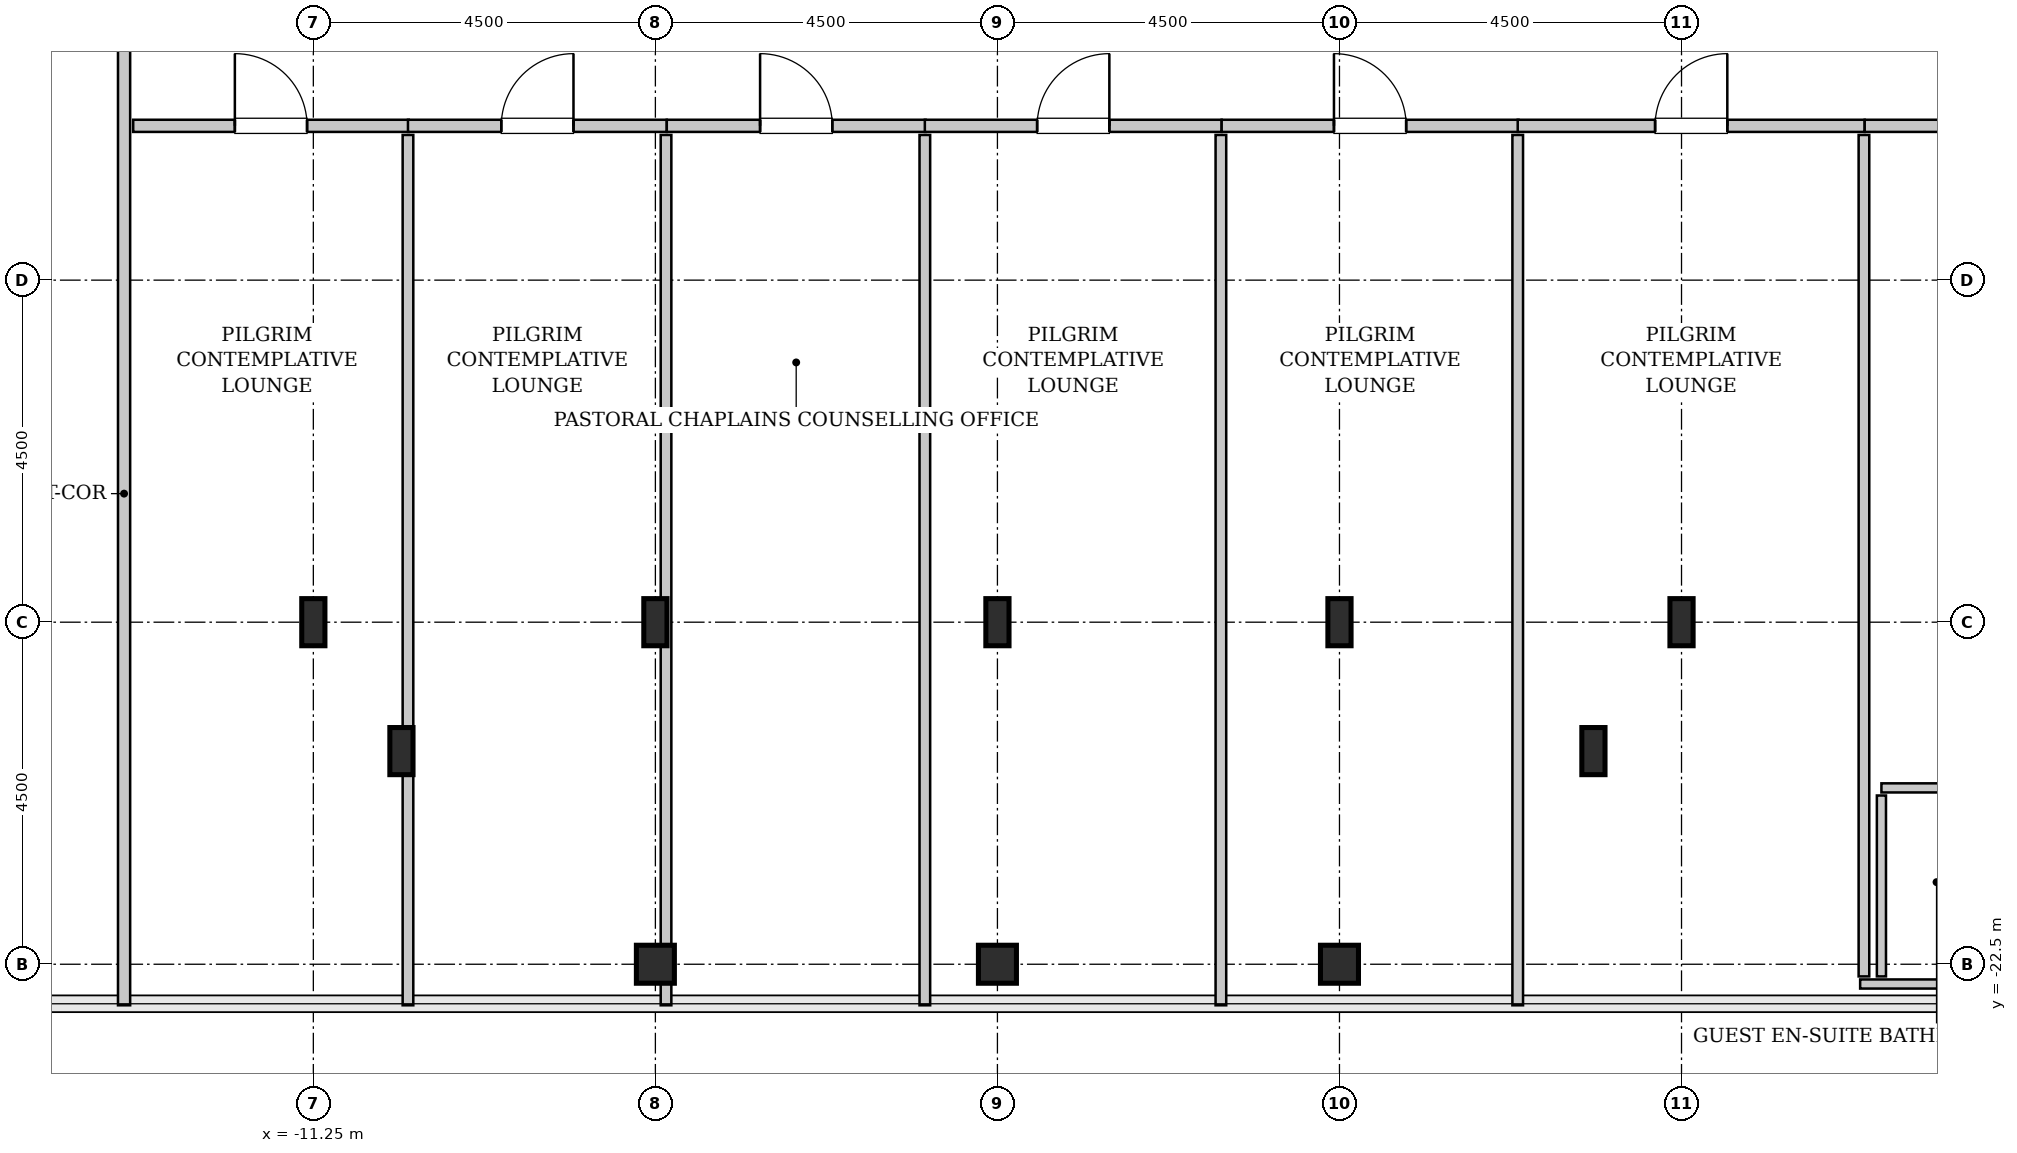
"""IFC4 building model, lengths in metres.
Left out: names, types, materials, properties, quantities, classifications, styles, units other than length and angle.
Written with IfcOpenShell. Run it as: python <this file> out.ifc"""

import sys

from ifc_helpers import new_model, si_unit, direction, frame, frame_2d, origin, origin_2d, place, context, subcontext, project, spatial, rectangle, hollow_rectangle, i_section, extrude, source, transform, mapped, element, fill, save


model = new_model("IFC4")
c1 = context("Model", 3, precision=1e-05, world=origin(), true_north=direction((0.0, 1.0)))
c2 = subcontext(c1, "Body", "Model", "MODEL_VIEW")
j1 = project(units=[si_unit("LENGTHUNIT", "METRE"), si_unit("PLANEANGLEUNIT", "RADIAN")], contexts=[c1])
p1 = place(None, origin())
s1 = spatial("IfcSite", under=j1, at=p1, CompositionType="ELEMENT")
p2 = place(p1, origin())
s2 = spatial("IfcBuilding", under=s1, at=p2, CompositionType="ELEMENT")
p3 = place(p2, frame((0.0, 0.0, 310.2)))
s3 = spatial("IfcBuildingStorey", under=s2, at=p3, CompositionType="ELEMENT", Elevation=310.2)
m1 = source(origin(), c2, "Body", "SweptSolid", [
    extrude(i_section(OverallWidth=0.305, OverallDepth=0.62, WebThickness=0.021, FlangeThickness=0.04, FilletRadius=0.027, at=origin_2d()), origin(), (0.0, 0.0, 1.0), 3.8),
])
for number, where, z_axis, x_axis in (
    (1, (-11.25, -18.0, 0.0), (0.0, 0.0, 1.0), (1.0, 0.0, 0.0)),
    (2, (-10.091, -19.696, 0.0), (0.0, 0.0, 1.0), (1.0, 0.0, 0.0)),
):
    element("IfcColumn", number, at=place(p3, frame(where, z_axis=z_axis, x_axis=x_axis)), inside=s3, PredefinedType="COLUMN", context=c2, shape_type="MappedRepresentation", body=[
        mapped(m1, transform((0.0, 0.0, 0.0), x_axis=(1.0, 0.0, 0.0), y_axis=(0.0, 1.0, 0.0), z_axis=(0.0, 0.0, 1.0), scale=1.0)),
    ])
m2 = source(origin(), c2, "Body", "SweptSolid", [
    extrude(hollow_rectangle(XDim=0.5, YDim=0.5, WallThickness=0.025, InnerFilletRadius=0.025, OuterFilletRadius=0.05, at=origin_2d()), origin(), (0.0, 0.0, 1.0), 3.8),
])
p4 = place(p3, frame((-6.75, -22.5, 0.0), z_axis=(0.0, 0.0, 1.0), x_axis=(1.0, 0.0, 0.0)))
e3 = element("IfcColumn", 3, at=p4, inside=s3, PredefinedType="COLUMN", context=c2, shape_type="MappedRepresentation", body=[
    mapped(m2, transform((0.0, 0.0, 0.0), x_axis=(1.0, 0.0, 0.0), y_axis=(0.0, 1.0, 0.0), z_axis=(0.0, 0.0, 1.0), scale=1.0)),
])
p5 = place(p3, frame((-6.75, -18.0, 0.0), z_axis=(0.0, 0.0, 1.0), x_axis=(1.0, 0.0, 0.0)))
e4 = element("IfcColumn", 4, at=p5, inside=s3, PredefinedType="COLUMN", context=c2, shape_type="MappedRepresentation", body=[
    mapped(m1, transform((0.0, 0.0, 0.0), x_axis=(1.0, 0.0, 0.0), y_axis=(0.0, 1.0, 0.0), z_axis=(0.0, 0.0, 1.0), scale=1.0)),
])
p6 = place(p3, frame((-2.25, -22.5, 0.0), z_axis=(0.0, 0.0, 1.0), x_axis=(1.0, 0.0, 0.0)))
e5 = element("IfcColumn", 5, at=p6, inside=s3, PredefinedType="COLUMN", context=c2, shape_type="MappedRepresentation", body=[
    mapped(m2, transform((0.0, 0.0, 0.0), x_axis=(1.0, 0.0, 0.0), y_axis=(0.0, 1.0, 0.0), z_axis=(0.0, 0.0, 1.0), scale=1.0)),
])
p7 = place(p3, frame((-2.25, -18.0, 0.0), z_axis=(0.0, 0.0, 1.0), x_axis=(1.0, 0.0, 0.0)))
e6 = element("IfcColumn", 6, at=p7, inside=s3, PredefinedType="COLUMN", context=c2, shape_type="MappedRepresentation", body=[
    mapped(m1, transform((0.0, 0.0, 0.0), x_axis=(1.0, 0.0, 0.0), y_axis=(0.0, 1.0, 0.0), z_axis=(0.0, 0.0, 1.0), scale=1.0)),
])
p8 = place(p3, frame((2.25, -22.5, 0.0), z_axis=(0.0, 0.0, 1.0), x_axis=(1.0, 0.0, 0.0)))
e7 = element("IfcColumn", 7, at=p8, inside=s3, PredefinedType="COLUMN", context=c2, shape_type="MappedRepresentation", body=[
    mapped(m2, transform((0.0, 0.0, 0.0), x_axis=(1.0, 0.0, 0.0), y_axis=(0.0, 1.0, 0.0), z_axis=(0.0, 0.0, 1.0), scale=1.0)),
])
for number, where, z_axis, x_axis in (
    (8, (2.25, -18.0, 0.0), (0.0, 0.0, 1.0), (1.0, 0.0, 0.0)),
    (9, (5.591, -19.696, 0.0), (0.0, 0.0, 1.0), (1.0, 0.0, 0.0)),
    (10, (6.75, -18.0, 0.0), (0.0, 0.0, 1.0), (1.0, 0.0, 0.0)),
):
    element("IfcColumn", number, at=place(p3, frame(where, z_axis=z_axis, x_axis=x_axis)), inside=s3, PredefinedType="COLUMN", context=c2, shape_type="MappedRepresentation", body=[
        mapped(m1, transform((0.0, 0.0, 0.0), x_axis=(1.0, 0.0, 0.0), y_axis=(0.0, 1.0, 0.0), z_axis=(0.0, 0.0, 1.0), scale=1.0)),
    ])
m3 = source(origin(), c2, "Body", "SweptSolid", [
    extrude(rectangle(XDim=3.14, YDim=0.12, at=frame_2d((1.57, 0.0))), origin(), (0.0, 0.0, 1.0), 3.535),
])
p9 = place(p3, frame((9.1, -22.76, 0.0), z_axis=(0.0, 0.0, 1.0), x_axis=(1.0, 0.0, 0.0)))
e11 = element("IfcWall", 11, at=p9, inside=s3, PredefinedType="PLUMBINGWALL", context=c2, shape_type="MappedRepresentation", body=[
    mapped(m3, transform((0.0, 0.0, 0.0), x_axis=(1.0, 0.0, 0.0), y_axis=(0.0, 1.0, 0.0), z_axis=(0.0, 0.0, 1.0), scale=1.0)),
])
m4 = source(origin(), c2, "Body", "SweptSolid", [
    extrude(rectangle(XDim=2.48, YDim=0.12, at=frame_2d((1.24, 0.0))), origin(), (0.0, 0.0, 1.0), 3.535),
])
p10 = place(p3, frame((9.38, -20.18, 0.0), z_axis=(0.0, 0.0, 1.0), x_axis=(1.0, 0.0, 0.0)))
e12 = element("IfcWall", 12, at=p10, inside=s3, PredefinedType="PLUMBINGWALL", context=c2, shape_type="MappedRepresentation", body=[
    mapped(m4, transform((0.0, 0.0, 0.0), x_axis=(1.0, 0.0, 0.0), y_axis=(0.0, 1.0, 0.0), z_axis=(0.0, 0.0, 1.0), scale=1.0)),
])
m5 = source(origin(), c2, "Body", "SweptSolid", [
    extrude(rectangle(XDim=2.38, YDim=0.12, at=frame_2d((1.19, 0.0))), origin(), (0.0, 0.0, 1.0), 3.535),
])
p11 = place(p3, frame((9.38, -22.66, 0.0), z_axis=(0.0, 0.0, 1.0), x_axis=(0.0, 1.0, 0.0)))
e13 = element("IfcWall", 13, at=p11, inside=s3, PredefinedType="PLUMBINGWALL", context=c2, shape_type="MappedRepresentation", body=[
    mapped(m5, transform((0.0, 0.0, 0.0), x_axis=(1.0, 0.0, 0.0), y_axis=(0.0, 1.0, 0.0), z_axis=(0.0, 0.0, 1.0), scale=1.0)),
])
m6 = source(origin(), c2, "Body", "SweptSolid", [
    extrude(rectangle(XDim=16.245, YDim=0.16, at=frame_2d((8.123, 0.0))), origin(), (0.0, 0.0, 1.0), 3.535),
])
p12 = place(p3, frame((-13.74, -23.04, 0.0), z_axis=(0.0, 0.0, 1.0), x_axis=(0.0, 1.0, 0.0)))
e14 = element("IfcWall", 14, at=p12, inside=s3, PredefinedType="PARTITIONING", context=c2, shape_type="MappedRepresentation", body=[
    mapped(m6, transform((0.0, 0.0, 0.0), x_axis=(1.0, 0.0, 0.0), y_axis=(0.0, 1.0, 0.0), z_axis=(0.0, 0.0, 1.0), scale=1.0)),
])
p13 = place(p12, frame((13.413, 0.0, 0.0)))
e15 = element("IfcOpeningElement", 15, at=p13, cuts=e14, PredefinedType="OPENING", context=c2, shape_type="SweptSolid", body=[
    extrude(rectangle(XDim=0.95, YDim=2.1, at=frame_2d((0.475, 1.05))), frame((0.0, 0.09, 0.0), z_axis=(0.0, -1.0, 0.0), x_axis=(1.0, 0.0, 0.0)), (0.0, 0.0, 1.0), 0.18),
])
m7 = source(origin(), c2, "Body", "SweptSolid", [
    extrude(rectangle(XDim=3.625, YDim=0.16, at=frame_2d((1.812, 0.0))), origin(), (0.0, 0.0, 1.0), 3.535),
])
p14 = place(p3, frame((-13.62, -11.47, 0.0), z_axis=(0.0, 0.0, 1.0), x_axis=(1.0, 0.0, 0.0)))
e16 = element("IfcWall", 16, at=p14, inside=s3, PredefinedType="PARTITIONING", context=c2, shape_type="MappedRepresentation", body=[
    mapped(m7, transform((0.0, 0.0, 0.0), x_axis=(1.0, 0.0, 0.0), y_axis=(0.0, 1.0, 0.0), z_axis=(0.0, 0.0, 1.0), scale=1.0)),
])
p15 = place(p14, frame((1.337, 0.0, 0.0)))
e17 = element("IfcOpeningElement", 17, at=p15, cuts=e16, PredefinedType="OPENING", context=c2, shape_type="SweptSolid", body=[
    extrude(rectangle(XDim=0.95, YDim=2.1, at=frame_2d((0.475, 1.05))), frame((0.0, 0.09, 0.0), z_axis=(0.0, -1.0, 0.0), x_axis=(1.0, 0.0, 0.0)), (0.0, 0.0, 1.0), 0.18),
])
m8 = source(origin(), c2, "Body", "SweptSolid", [
    extrude(rectangle(XDim=11.45, YDim=0.14, at=frame_2d((5.725, 0.0))), origin(), (0.0, 0.0, 1.0), 3.535),
])
p16 = place(p3, frame((-10.005, -23.04, 0.0), z_axis=(0.0, 0.0, 1.0), x_axis=(0.0, 1.0, 0.0)))
e18 = element("IfcWall", 18, at=p16, inside=s3, PredefinedType="PARTITIONING", context=c2, shape_type="MappedRepresentation", body=[
    mapped(m8, transform((0.0, 0.0, 0.0), x_axis=(1.0, 0.0, 0.0), y_axis=(0.0, 1.0, 0.0), z_axis=(0.0, 0.0, 1.0), scale=1.0)),
])
m9 = source(origin(), c2, "Body", "SweptSolid", [
    extrude(rectangle(XDim=3.405, YDim=0.16, at=frame_2d((1.702, 0.0))), origin(), (0.0, 0.0, 1.0), 3.535),
])
p17 = place(p3, frame((-10.005, -11.47, 0.0), z_axis=(0.0, 0.0, 1.0), x_axis=(1.0, 0.0, 0.0)))
e19 = element("IfcWall", 19, at=p17, inside=s3, PredefinedType="PARTITIONING", context=c2, shape_type="MappedRepresentation", body=[
    mapped(m9, transform((0.0, 0.0, 0.0), x_axis=(1.0, 0.0, 0.0), y_axis=(0.0, 1.0, 0.0), z_axis=(0.0, 0.0, 1.0), scale=1.0)),
])
p18 = place(p17, frame((1.228, 0.0, 0.0)))
e20 = element("IfcOpeningElement", 20, at=p18, cuts=e19, PredefinedType="OPENING", context=c2, shape_type="SweptSolid", body=[
    extrude(rectangle(XDim=0.95, YDim=2.1, at=frame_2d((0.475, 1.05))), frame((0.0, 0.09, 0.0), z_axis=(0.0, -1.0, 0.0), x_axis=(1.0, 0.0, 0.0)), (0.0, 0.0, 1.0), 0.18),
])
m10 = source(origin(), c2, "Body", "SweptSolid", [
    extrude(rectangle(XDim=11.45, YDim=0.14, at=frame_2d((5.725, 0.0))), origin(), (0.0, 0.0, 1.0), 2.975),
])
p19 = place(p3, frame((-6.61, -23.04, 0.0), z_axis=(0.0, 0.0, 1.0), x_axis=(0.0, 1.0, 0.0)))
e21 = element("IfcWall", 21, at=p19, inside=s3, PredefinedType="PARTITIONING", context=c2, shape_type="MappedRepresentation", body=[
    mapped(m10, transform((0.0, 0.0, 0.0), x_axis=(1.0, 0.0, 0.0), y_axis=(0.0, 1.0, 0.0), z_axis=(0.0, 0.0, 1.0), scale=1.0)),
])
m11 = source(origin(), c2, "Body", "SweptSolid", [
    extrude(rectangle(XDim=3.405, YDim=0.16, at=frame_2d((1.703, 0.0))), origin(), (0.0, 0.0, 1.0), 3.535),
])
p20 = place(p3, frame((-6.6, -11.47, 0.0), z_axis=(0.0, 0.0, 1.0), x_axis=(1.0, 0.0, 0.0)))
e22 = element("IfcWall", 22, at=p20, inside=s3, PredefinedType="PARTITIONING", context=c2, shape_type="MappedRepresentation", body=[
    mapped(m11, transform((0.0, 0.0, 0.0), x_axis=(1.0, 0.0, 0.0), y_axis=(0.0, 1.0, 0.0), z_axis=(0.0, 0.0, 1.0), scale=1.0)),
])
p21 = place(p20, frame((1.228, 0.0, 0.0)))
e23 = element("IfcOpeningElement", 23, at=p21, cuts=e22, PredefinedType="OPENING", context=c2, shape_type="SweptSolid", body=[
    extrude(rectangle(XDim=0.95, YDim=2.1, at=frame_2d((0.475, 1.05))), frame((0.0, 0.09, 0.0), z_axis=(0.0, -1.0, 0.0), x_axis=(1.0, 0.0, 0.0)), (0.0, 0.0, 1.0), 0.18),
])
p22 = place(p3, frame((-3.205, -23.04, 0.0), z_axis=(0.0, 0.0, 1.0), x_axis=(0.0, 1.0, 0.0)))
e24 = element("IfcWall", 24, at=p22, inside=s3, PredefinedType="PARTITIONING", context=c2, shape_type="MappedRepresentation", body=[
    mapped(m8, transform((0.0, 0.0, 0.0), x_axis=(1.0, 0.0, 0.0), y_axis=(0.0, 1.0, 0.0), z_axis=(0.0, 0.0, 1.0), scale=1.0)),
])
m12 = source(origin(), c2, "Body", "SweptSolid", [
    extrude(rectangle(XDim=3.905, YDim=0.16, at=frame_2d((1.953, 0.0))), origin(), (0.0, 0.0, 1.0), 3.535),
])
p23 = place(p3, frame((-3.205, -11.47, 0.0), z_axis=(0.0, 0.0, 1.0), x_axis=(1.0, 0.0, 0.0)))
e25 = element("IfcWall", 25, at=p23, inside=s3, PredefinedType="PARTITIONING", context=c2, shape_type="MappedRepresentation", body=[
    mapped(m12, transform((0.0, 0.0, 0.0), x_axis=(1.0, 0.0, 0.0), y_axis=(0.0, 1.0, 0.0), z_axis=(0.0, 0.0, 1.0), scale=1.0)),
])
p24 = place(p23, frame((1.478, 0.0, 0.0)))
e26 = element("IfcOpeningElement", 26, at=p24, cuts=e25, PredefinedType="OPENING", context=c2, shape_type="SweptSolid", body=[
    extrude(rectangle(XDim=0.95, YDim=2.1, at=frame_2d((0.475, 1.05))), frame((0.0, 0.09, 0.0), z_axis=(0.0, -1.0, 0.0), x_axis=(1.0, 0.0, 0.0)), (0.0, 0.0, 1.0), 0.18),
])
p25 = place(p3, frame((0.69, -23.04, 0.0), z_axis=(0.0, 0.0, 1.0), x_axis=(0.0, 1.0, 0.0)))
e27 = element("IfcWall", 27, at=p25, inside=s3, PredefinedType="PARTITIONING", context=c2, shape_type="MappedRepresentation", body=[
    mapped(m8, transform((0.0, 0.0, 0.0), x_axis=(1.0, 0.0, 0.0), y_axis=(0.0, 1.0, 0.0), z_axis=(0.0, 0.0, 1.0), scale=1.0)),
])
p26 = place(p3, frame((0.7, -11.47, 0.0), z_axis=(0.0, 0.0, 1.0), x_axis=(1.0, 0.0, 0.0)))
e28 = element("IfcWall", 28, at=p26, inside=s3, PredefinedType="PARTITIONING", context=c2, shape_type="MappedRepresentation", body=[
    mapped(m12, transform((0.0, 0.0, 0.0), x_axis=(1.0, 0.0, 0.0), y_axis=(0.0, 1.0, 0.0), z_axis=(0.0, 0.0, 1.0), scale=1.0)),
])
p27 = place(p26, frame((1.478, 0.0, 0.0)))
e29 = element("IfcOpeningElement", 29, at=p27, cuts=e28, PredefinedType="OPENING", context=c2, shape_type="SweptSolid", body=[
    extrude(rectangle(XDim=0.95, YDim=2.1, at=frame_2d((0.475, 1.05))), frame((0.0, 0.09, 0.0), z_axis=(0.0, -1.0, 0.0), x_axis=(1.0, 0.0, 0.0)), (0.0, 0.0, 1.0), 0.18),
])
p28 = place(p3, frame((4.595, -23.04, 0.0), z_axis=(0.0, 0.0, 1.0), x_axis=(0.0, 1.0, 0.0)))
e30 = element("IfcWall", 30, at=p28, inside=s3, PredefinedType="PARTITIONING", context=c2, shape_type="MappedRepresentation", body=[
    mapped(m8, transform((0.0, 0.0, 0.0), x_axis=(1.0, 0.0, 0.0), y_axis=(0.0, 1.0, 0.0), z_axis=(0.0, 0.0, 1.0), scale=1.0)),
])
m13 = source(origin(), c2, "Body", "SweptSolid", [
    extrude(rectangle(XDim=4.565, YDim=0.16, at=frame_2d((2.282, 0.0))), origin(), (0.0, 0.0, 1.0), 3.535),
])
p29 = place(p3, frame((4.595, -11.47, 0.0), z_axis=(0.0, 0.0, 1.0), x_axis=(1.0, 0.0, 0.0)))
e31 = element("IfcWall", 31, at=p29, inside=s3, PredefinedType="PARTITIONING", context=c2, shape_type="MappedRepresentation", body=[
    mapped(m13, transform((0.0, 0.0, 0.0), x_axis=(1.0, 0.0, 0.0), y_axis=(0.0, 1.0, 0.0), z_axis=(0.0, 0.0, 1.0), scale=1.0)),
])
p30 = place(p29, frame((1.808, 0.0, 0.0)))
e32 = element("IfcOpeningElement", 32, at=p30, cuts=e31, PredefinedType="OPENING", context=c2, shape_type="SweptSolid", body=[
    extrude(rectangle(XDim=0.95, YDim=2.1, at=frame_2d((0.475, 1.05))), frame((0.0, 0.09, 0.0), z_axis=(0.0, -1.0, 0.0), x_axis=(1.0, 0.0, 0.0)), (0.0, 0.0, 1.0), 0.18),
])
m14 = source(origin(), c2, "Body", "SweptSolid", [
    extrude(rectangle(XDim=11.07, YDim=0.14, at=frame_2d((5.535, 0.0))), origin(), (0.0, 0.0, 1.0), 3.535),
])
p31 = place(p3, frame((9.15, -22.66, 0.0), z_axis=(0.0, 0.0, 1.0), x_axis=(0.0, 1.0, 0.0)))
e33 = element("IfcWall", 33, at=p31, inside=s3, PredefinedType="PARTITIONING", context=c2, shape_type="MappedRepresentation", body=[
    mapped(m14, transform((0.0, 0.0, 0.0), x_axis=(1.0, 0.0, 0.0), y_axis=(0.0, 1.0, 0.0), z_axis=(0.0, 0.0, 1.0), scale=1.0)),
])
m15 = source(origin(), c2, "Body", "SweptSolid", [
    extrude(rectangle(XDim=4.46, YDim=0.16, at=frame_2d((2.23, 0.0))), origin(), (0.0, 0.0, 1.0), 3.535),
])
p32 = place(p3, frame((9.16, -11.47, 0.0), z_axis=(0.0, 0.0, 1.0), x_axis=(1.0, 0.0, 0.0)))
e34 = element("IfcWall", 34, at=p32, inside=s3, PredefinedType="PARTITIONING", context=c2, shape_type="MappedRepresentation", body=[
    mapped(m15, transform((0.0, 0.0, 0.0), x_axis=(1.0, 0.0, 0.0), y_axis=(0.0, 1.0, 0.0), z_axis=(0.0, 0.0, 1.0), scale=1.0)),
])
p33 = place(p32, frame((1.755, 0.0, 0.0)))
e35 = element("IfcOpeningElement", 35, at=p33, cuts=e34, PredefinedType="OPENING", context=c2, shape_type="SweptSolid", body=[
    extrude(rectangle(XDim=0.95, YDim=2.1, at=frame_2d((0.475, 1.05))), frame((0.0, 0.09, 0.0), z_axis=(0.0, -1.0, 0.0), x_axis=(1.0, 0.0, 0.0)), (0.0, 0.0, 1.0), 0.18),
])
m16 = source(origin(), c2, "Body", "SweptSolid", [
    extrude(rectangle(XDim=0.95, YDim=2.1, at=frame_2d((0.475, 1.05))), frame((0.0, 0.025, 0.0), z_axis=(0.0, -1.0, 0.0), x_axis=(1.0, 0.0, 0.0)), (0.0, 0.0, 1.0), 0.05),
])
p34 = place(p15, origin())
e36 = element("IfcDoor", 36, at=p34, inside=s3, OperationType="SINGLE_SWING_LEFT", PredefinedType="DOOR", context=c2, shape_type="MappedRepresentation", body=[
    mapped(m16, transform((0.0, 0.0, 0.0), x_axis=(1.0, 0.0, 0.0), y_axis=(0.0, 1.0, 0.0), z_axis=(0.0, 0.0, 1.0), scale=1.0)),
])
fill(e17, e36)
p35 = place(p18, origin())
e37 = element("IfcDoor", 37, at=p35, inside=s3, OperationType="SINGLE_SWING_RIGHT", PredefinedType="DOOR", context=c2, shape_type="MappedRepresentation", body=[
    mapped(m16, transform((0.0, 0.0, 0.0), x_axis=(1.0, 0.0, 0.0), y_axis=(0.0, 1.0, 0.0), z_axis=(0.0, 0.0, 1.0), scale=1.0)),
])
fill(e20, e37)
p36 = place(p21, origin())
e38 = element("IfcDoor", 38, at=p36, inside=s3, OperationType="SINGLE_SWING_LEFT", PredefinedType="DOOR", context=c2, shape_type="MappedRepresentation", body=[
    mapped(m16, transform((0.0, 0.0, 0.0), x_axis=(1.0, 0.0, 0.0), y_axis=(0.0, 1.0, 0.0), z_axis=(0.0, 0.0, 1.0), scale=1.0)),
])
fill(e23, e38)
p37 = place(p24, origin())
e39 = element("IfcDoor", 39, at=p37, inside=s3, OperationType="SINGLE_SWING_RIGHT", PredefinedType="DOOR", context=c2, shape_type="MappedRepresentation", body=[
    mapped(m16, transform((0.0, 0.0, 0.0), x_axis=(1.0, 0.0, 0.0), y_axis=(0.0, 1.0, 0.0), z_axis=(0.0, 0.0, 1.0), scale=1.0)),
])
fill(e26, e39)
p38 = place(p27, origin())
e40 = element("IfcDoor", 40, at=p38, inside=s3, OperationType="SINGLE_SWING_LEFT", PredefinedType="DOOR", context=c2, shape_type="MappedRepresentation", body=[
    mapped(m16, transform((0.0, 0.0, 0.0), x_axis=(1.0, 0.0, 0.0), y_axis=(0.0, 1.0, 0.0), z_axis=(0.0, 0.0, 1.0), scale=1.0)),
])
fill(e29, e40)
p39 = place(p30, origin())
e41 = element("IfcDoor", 41, at=p39, inside=s3, OperationType="SINGLE_SWING_RIGHT", PredefinedType="DOOR", context=c2, shape_type="MappedRepresentation", body=[
    mapped(m16, transform((0.0, 0.0, 0.0), x_axis=(1.0, 0.0, 0.0), y_axis=(0.0, 1.0, 0.0), z_axis=(0.0, 0.0, 1.0), scale=1.0)),
])
fill(e32, e41)
save(model, sys.argv[1])
